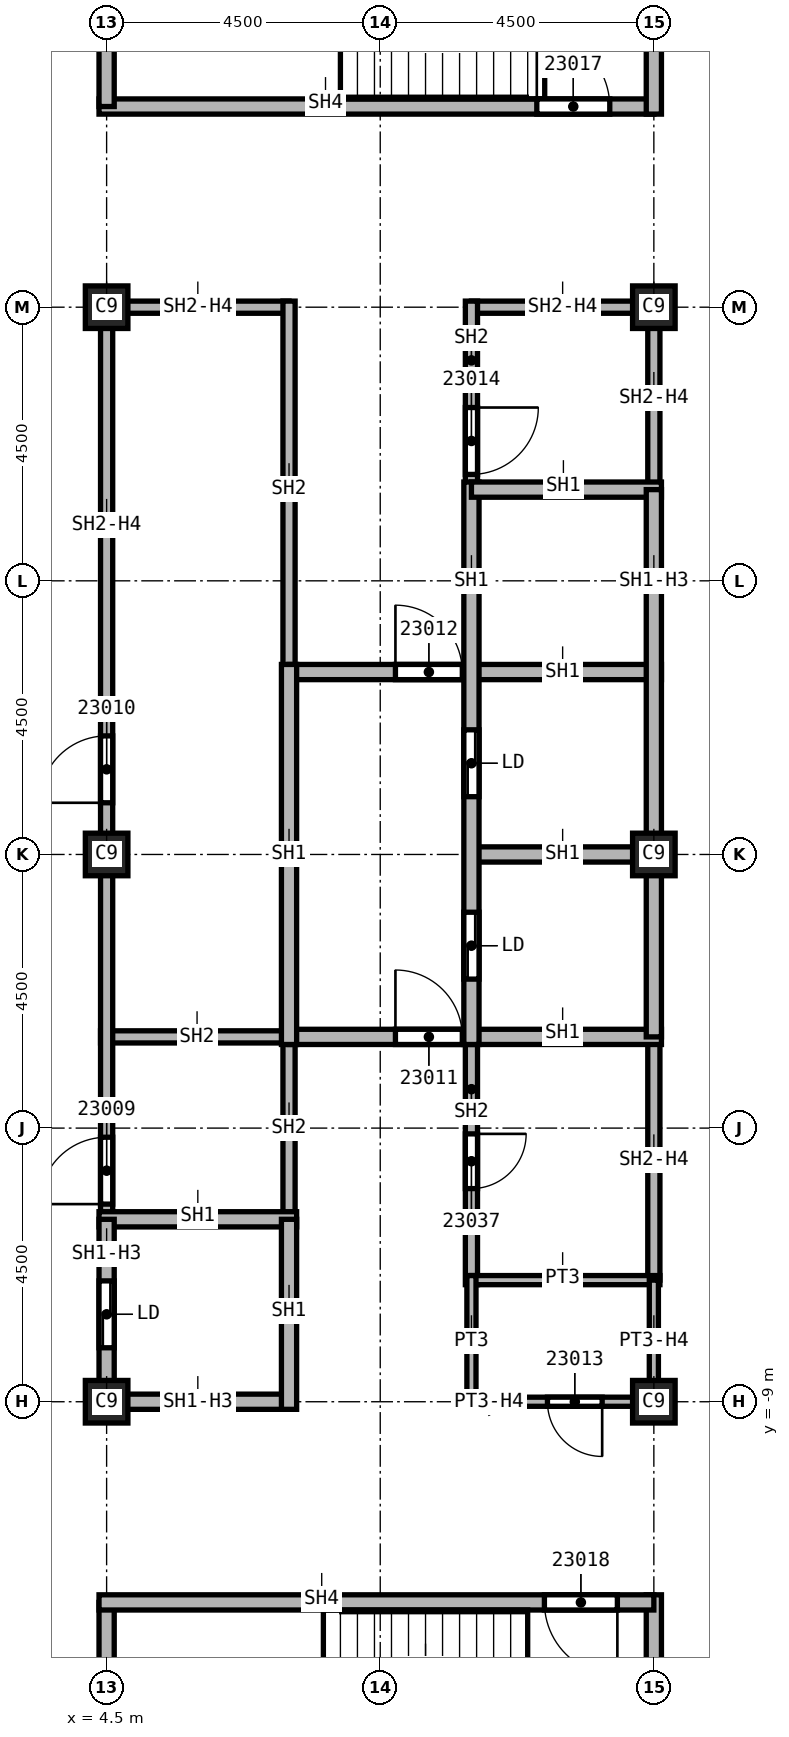
"""IFC4 building model, lengths in metres.
Left out: names, types, materials, properties, quantities, classifications, styles, units other than length and angle.
Written with IfcOpenShell. Run it as: python <this file> out.ifc"""

import sys

from ifc_helpers import new_model, si_unit, direction, frame, frame_2d, origin, origin_2d, place, context, subcontext, project, spatial, rectangle, extrude, element, fill, save


model = new_model("IFC4")
c1 = context("Model", 3, precision=1e-05, world=origin(), true_north=direction((0.0, 1.0)))
c2 = subcontext(c1, "Body", "Model", "MODEL_VIEW")
j1 = project(units=[si_unit("LENGTHUNIT", "METRE"), si_unit("PLANEANGLEUNIT", "RADIAN")], contexts=[c1])
p1 = place(None, origin())
s1 = spatial("IfcSite", under=j1, at=p1, CompositionType="ELEMENT")
p2 = place(p1, origin())
s2 = spatial("IfcBuilding", under=s1, at=p2, CompositionType="ELEMENT")
p3 = place(p2, frame((0.0, 0.0, 330.0)))
s3 = spatial("IfcBuildingStorey", under=s2, at=p3, CompositionType="ELEMENT", Elevation=330.0)
for number, where, z_axis, x_axis in (
    (1, (4.5, 0.0, 0.0), (0.0, 0.0, 1.0), (1.0, 0.0, 0.0)),
    (2, (4.5, 9.0, 0.0), (0.0, 0.0, 1.0), (1.0, 0.0, 0.0)),
    (3, (4.5, -9.0, 0.0), (0.0, 0.0, 1.0), (1.0, 0.0, 0.0)),
    (4, (13.5, 0.0, 0.0), (0.0, 0.0, 1.0), (1.0, 0.0, 0.0)),
    (5, (13.5, 9.0, 0.0), (0.0, 0.0, 1.0), (1.0, 0.0, 0.0)),
    (6, (13.5, -9.0, 0.0), (0.0, 0.0, 1.0), (1.0, 0.0, 0.0)),
):
    element("IfcColumn", number, at=place(p3, frame(where, z_axis=z_axis, x_axis=x_axis)), inside=s3, PredefinedType="COLUMN", context=c2, shape_type="SweptSolid", body=[
        extrude(rectangle(XDim=0.7, YDim=0.7, at=origin_2d()), origin(), (0.0, 0.0, 1.0), 3.74),
    ])
p4 = place(p3, frame((4.4, -3.0, 0.0), z_axis=(0.0, 0.0, 1.0), x_axis=(1.0, 0.0, 0.0)))
e7 = element("IfcWall", 7, at=p4, inside=s3, PredefinedType="SOLIDWALL", context=c2, shape_type="SweptSolid", body=[
    extrude(rectangle(XDim=3.225, YDim=0.2, at=frame_2d((1.613, 0.0))), origin(), (0.0, 0.0, 1.0), 3.74),
])
p5 = place(p3, frame((4.5, -6.0, 0.0), z_axis=(0.0, 0.0, 1.0), x_axis=(0.0, 1.0, 0.0)))
e8 = element("IfcWall", 8, at=p5, inside=s3, PredefinedType="SOLIDWALL", context=c2, shape_type="SweptSolid", body=[
    extrude(rectangle(XDim=15.1, YDim=0.2, at=frame_2d((7.55, 0.0))), origin(), (0.0, 0.0, 1.0), 3.062),
])
p6 = place(p5, frame((0.25, 0.0, 0.0)))
e9 = element("IfcOpeningElement", 9, at=p6, cuts=e8, PredefinedType="OPENING", context=c2, shape_type="SweptSolid", body=[
    extrude(rectangle(XDim=1.1, YDim=2.1, at=frame_2d((0.55, 1.05))), frame((0.0, 0.1, 0.0), z_axis=(0.0, -1.0, 0.0), x_axis=(1.0, 0.0, 0.0)), (0.0, 0.0, 1.0), 0.2),
])
p7 = place(p5, frame((6.85, 0.0, 0.0)))
e10 = element("IfcOpeningElement", 10, at=p7, cuts=e8, PredefinedType="OPENING", context=c2, shape_type="SweptSolid", body=[
    extrude(rectangle(XDim=1.1, YDim=2.1, at=frame_2d((0.55, 1.05))), frame((0.0, 0.1, 0.0), z_axis=(0.0, -1.0, 0.0), x_axis=(1.0, 0.0, 0.0)), (0.0, 0.0, 1.0), 0.2),
])
p8 = place(p3, frame((4.5, 9.0, 0.0), z_axis=(0.0, 0.0, 1.0), x_axis=(1.0, 0.0, 0.0)))
e11 = element("IfcWall", 11, at=p8, inside=s3, PredefinedType="SOLIDWALL", context=c2, shape_type="SweptSolid", body=[
    extrude(rectangle(XDim=3.0, YDim=0.2, at=frame_2d((1.5, 0.0))), origin(), (0.0, 0.0, 1.0), 3.062),
])
p9 = place(p3, frame((7.5, -2.875, 0.0), z_axis=(0.0, 0.0, 1.0), x_axis=(0.0, -1.0, 0.0)))
e12 = element("IfcWall", 12, at=p9, inside=s3, PredefinedType="SOLIDWALL", context=c2, shape_type="SweptSolid", body=[
    extrude(rectangle(XDim=3.125, YDim=0.2, at=frame_2d((1.562, 0.0))), origin(), (0.0, 0.0, 1.0), 3.74),
])
p10 = place(p3, frame((7.5, 9.1, 0.0), z_axis=(0.0, 0.0, 1.0), x_axis=(0.0, -1.0, 0.0)))
e13 = element("IfcWall", 13, at=p10, inside=s3, PredefinedType="SOLIDWALL", context=c2, shape_type="SweptSolid", body=[
    extrude(rectangle(XDim=6.225, YDim=0.2, at=frame_2d((3.113, 0.0))), origin(), (0.0, 0.0, 1.0), 3.74),
])
p11 = place(p3, frame((10.5, -2.875, 0.0), z_axis=(0.0, 0.0, 1.0), x_axis=(0.0, -1.0, 0.0)))
e14 = element("IfcWall", 14, at=p11, inside=s3, PredefinedType="SOLIDWALL", context=c2, shape_type="SweptSolid", body=[
    extrude(rectangle(XDim=4.2, YDim=0.2, at=frame_2d((2.1, 0.0))), origin(), (0.0, 0.0, 1.0), 3.74),
])
p12 = place(p11, frame((1.72, 0.0, 0.0)))
e15 = element("IfcOpeningElement", 15, at=p12, cuts=e14, PredefinedType="OPENING", context=c2, shape_type="SweptSolid", body=[
    extrude(rectangle(XDim=0.9, YDim=2.1, at=frame_2d((0.45, 1.05))), frame((0.0, 0.1, 0.0), z_axis=(0.0, -1.0, 0.0), x_axis=(1.0, 0.0, 0.0)), (0.0, 0.0, 1.0), 0.2),
])
p13 = place(p3, frame((10.5, 9.0, 0.0), z_axis=(0.0, 0.0, 1.0), x_axis=(1.0, 0.0, 0.0)))
e16 = element("IfcWall", 16, at=p13, inside=s3, PredefinedType="SOLIDWALL", context=c2, shape_type="SweptSolid", body=[
    extrude(rectangle(XDim=3.0, YDim=0.2, at=frame_2d((1.5, 0.0))), origin(), (0.0, 0.0, 1.0), 3.062),
])
p14 = place(p3, frame((10.5, 9.1, 0.0), z_axis=(0.0, 0.0, 1.0), x_axis=(0.0, -1.0, 0.0)))
e17 = element("IfcWall", 17, at=p14, inside=s3, PredefinedType="SOLIDWALL", context=c2, shape_type="SweptSolid", body=[
    extrude(rectangle(XDim=3.225, YDim=0.2, at=frame_2d((1.613, 0.0))), origin(), (0.0, 0.0, 1.0), 3.74),
])
p15 = place(p14, frame((1.75, 0.0, 0.0)))
e18 = element("IfcOpeningElement", 18, at=p15, cuts=e17, PredefinedType="OPENING", context=c2, shape_type="SweptSolid", body=[
    extrude(rectangle(XDim=1.1, YDim=2.1, at=frame_2d((0.55, 1.05))), frame((0.0, 0.1, 0.0), z_axis=(0.0, -1.0, 0.0), x_axis=(1.0, 0.0, 0.0)), (0.0, 0.0, 1.0), 0.2),
])
p16 = place(p3, frame((13.5, -3.0, 0.0), z_axis=(0.0, 0.0, 1.0), x_axis=(0.0, -1.0, 0.0)))
e19 = element("IfcWall", 19, at=p16, inside=s3, PredefinedType="SOLIDWALL", context=c2, shape_type="SweptSolid", body=[
    extrude(rectangle(XDim=4.0, YDim=0.2, at=frame_2d((2.0, 0.0))), origin(), (0.0, 0.0, 1.0), 3.062),
])
p17 = place(p3, frame((13.5, 9.1, 0.0), z_axis=(0.0, 0.0, 1.0), x_axis=(0.0, -1.0, 0.0)))
e20 = element("IfcWall", 20, at=p17, inside=s3, PredefinedType="SOLIDWALL", context=c2, shape_type="SweptSolid", body=[
    extrude(rectangle(XDim=3.1, YDim=0.2, at=frame_2d((1.55, 0.0))), origin(), (0.0, 0.0, 1.0), 3.062),
])
p18 = place(p3, frame((4.375, -6.0, 0.0), z_axis=(0.0, 0.0, 1.0), x_axis=(1.0, 0.0, 0.0)))
e21 = element("IfcWall", 21, at=p18, inside=s3, PredefinedType="SOLIDWALL", context=c2, shape_type="SweptSolid", body=[
    extrude(rectangle(XDim=3.25, YDim=0.25, at=frame_2d((1.625, 0.0))), origin(), (0.0, 0.0, 1.0), 3.74),
])
p19 = place(p3, frame((4.5, -9.125, 0.0), z_axis=(0.0, 0.0, 1.0), x_axis=(0.0, 1.0, 0.0)))
e22 = element("IfcWall", 22, at=p19, inside=s3, PredefinedType="SOLIDWALL", context=c2, shape_type="SweptSolid", body=[
    extrude(rectangle(XDim=3.125, YDim=0.25, at=frame_2d((1.562, 0.0))), origin(), (0.0, 0.0, 1.0), 3.062),
])
p20 = place(p19, frame((1.012, 0.0, 0.0)))
e23 = element("IfcOpeningElement", 23, at=p20, cuts=e22, PredefinedType="OPENING", context=c2, shape_type="SweptSolid", body=[
    extrude(rectangle(XDim=1.1, YDim=2.1, at=frame_2d((0.55, 1.05))), frame((0.0, 0.125, 0.0), z_axis=(0.0, -1.0, 0.0), x_axis=(1.0, 0.0, 0.0)), (0.0, 0.0, 1.0), 0.25),
])
p21 = place(p3, frame((7.5, -9.0, 0.0), z_axis=(0.0, 0.0, 1.0), x_axis=(-1.0, 0.0, 0.0)))
e24 = element("IfcWall", 24, at=p21, inside=s3, PredefinedType="SOLIDWALL", context=c2, shape_type="SweptSolid", body=[
    extrude(rectangle(XDim=3.0, YDim=0.25, at=frame_2d((1.5, 0.0))), origin(), (0.0, 0.0, 1.0), 3.062),
])
p22 = place(p3, frame((7.5, -6.0, 0.0), z_axis=(0.0, 0.0, 1.0), x_axis=(0.0, -1.0, 0.0)))
e25 = element("IfcWall", 25, at=p22, inside=s3, PredefinedType="SOLIDWALL", context=c2, shape_type="SweptSolid", body=[
    extrude(rectangle(XDim=3.125, YDim=0.25, at=frame_2d((1.562, 0.0))), origin(), (0.0, 0.0, 1.0), 3.74),
])
p23 = place(p3, frame((7.5, -3.0, 0.0), z_axis=(0.0, 0.0, 1.0), x_axis=(1.0, 0.0, 0.0)))
e26 = element("IfcWall", 26, at=p23, inside=s3, PredefinedType="SOLIDWALL", context=c2, shape_type="SweptSolid", body=[
    extrude(rectangle(XDim=6.125, YDim=0.25, at=frame_2d((3.062, 0.0))), origin(), (0.0, 0.0, 1.0), 3.74),
])
p24 = place(p23, frame((1.75, 0.0, 0.0)))
e27 = element("IfcOpeningElement", 27, at=p24, cuts=e26, PredefinedType="OPENING", context=c2, shape_type="SweptSolid", body=[
    extrude(rectangle(XDim=1.1, YDim=2.1, at=frame_2d((0.55, 1.05))), frame((0.0, 0.125, 0.0), z_axis=(0.0, -1.0, 0.0), x_axis=(1.0, 0.0, 0.0)), (0.0, 0.0, 1.0), 0.25),
])
p25 = place(p3, frame((7.5, 3.0, 0.0), z_axis=(0.0, 0.0, 1.0), x_axis=(1.0, 0.0, 0.0)))
e28 = element("IfcWall", 28, at=p25, inside=s3, PredefinedType="SOLIDWALL", context=c2, shape_type="SweptSolid", body=[
    extrude(rectangle(XDim=6.125, YDim=0.25, at=frame_2d((3.062, 0.0))), origin(), (0.0, 0.0, 1.0), 3.74),
])
p26 = place(p25, frame((1.75, 0.0, 0.0)))
e29 = element("IfcOpeningElement", 29, at=p26, cuts=e28, PredefinedType="OPENING", context=c2, shape_type="SweptSolid", body=[
    extrude(rectangle(XDim=1.1, YDim=2.1, at=frame_2d((0.55, 1.05))), frame((0.0, 0.125, 0.0), z_axis=(0.0, -1.0, 0.0), x_axis=(1.0, 0.0, 0.0)), (0.0, 0.0, 1.0), 0.25),
])
p27 = place(p3, frame((7.5, 3.125, 0.0), z_axis=(0.0, 0.0, 1.0), x_axis=(0.0, -1.0, 0.0)))
e30 = element("IfcWall", 30, at=p27, inside=s3, PredefinedType="SOLIDWALL", context=c2, shape_type="SweptSolid", body=[
    extrude(rectangle(XDim=6.25, YDim=0.25, at=frame_2d((3.125, 0.0))), origin(), (0.0, 0.0, 1.0), 3.74),
])
p28 = place(p3, frame((10.5, 0.0, 0.0), z_axis=(0.0, 0.0, 1.0), x_axis=(1.0, 0.0, 0.0)))
e31 = element("IfcWall", 31, at=p28, inside=s3, PredefinedType="SOLIDWALL", context=c2, shape_type="SweptSolid", body=[
    extrude(rectangle(XDim=3.125, YDim=0.25, at=frame_2d((1.562, 0.0))), origin(), (0.0, 0.0, 1.0), 3.74),
])
p29 = place(p3, frame((10.5, 6.125, 0.0), z_axis=(0.0, 0.0, 1.0), x_axis=(0.0, -1.0, 0.0)))
e32 = element("IfcWall", 32, at=p29, inside=s3, PredefinedType="SOLIDWALL", context=c2, shape_type="SweptSolid", body=[
    extrude(rectangle(XDim=9.25, YDim=0.25, at=frame_2d((4.625, 0.0))), origin(), (0.0, 0.0, 1.0), 3.74),
])
p30 = place(p29, frame((7.075, 0.0, 0.0)))
e33 = element("IfcOpeningElement", 33, at=p30, cuts=e32, PredefinedType="OPENING", context=c2, shape_type="SweptSolid", body=[
    extrude(rectangle(XDim=1.1, YDim=2.1, at=frame_2d((0.55, 1.05))), frame((0.0, 0.125, 0.0), z_axis=(0.0, -1.0, 0.0), x_axis=(1.0, 0.0, 0.0)), (0.0, 0.0, 1.0), 0.25),
])
p31 = place(p29, frame((4.075, 0.0, 0.0)))
e34 = element("IfcOpeningElement", 34, at=p31, cuts=e32, PredefinedType="OPENING", context=c2, shape_type="SweptSolid", body=[
    extrude(rectangle(XDim=1.1, YDim=2.1, at=frame_2d((0.55, 1.05))), frame((0.0, 0.125, 0.0), z_axis=(0.0, -1.0, 0.0), x_axis=(1.0, 0.0, 0.0)), (0.0, 0.0, 1.0), 0.25),
])
p32 = place(p3, frame((10.5, 6.0, 0.0), z_axis=(0.0, 0.0, 1.0), x_axis=(1.0, 0.0, 0.0)))
e35 = element("IfcWall", 35, at=p32, inside=s3, PredefinedType="SOLIDWALL", context=c2, shape_type="SweptSolid", body=[
    extrude(rectangle(XDim=3.125, YDim=0.25, at=frame_2d((1.562, 0.0))), origin(), (0.0, 0.0, 1.0), 3.74),
])
p33 = place(p3, frame((13.5, 6.0, 0.0), z_axis=(0.0, 0.0, 1.0), x_axis=(0.0, -1.0, 0.0)))
e36 = element("IfcWall", 36, at=p33, inside=s3, PredefinedType="SOLIDWALL", context=c2, shape_type="SweptSolid", body=[
    extrude(rectangle(XDim=9.0, YDim=0.25, at=frame_2d((4.5, 0.0))), origin(), (0.0, 0.0, 1.0), 3.062),
])
p34 = place(p3, frame((4.375, 12.3, 0.0), z_axis=(0.0, 0.0, 1.0), x_axis=(1.0, 0.0, 0.0)))
e37 = element("IfcWall", 37, at=p34, inside=s3, PredefinedType="SOLIDWALL", context=c2, shape_type="SweptSolid", body=[
    extrude(rectangle(XDim=9.125, YDim=0.25, at=frame_2d((4.562, 0.0))), origin(), (0.0, 0.0, 1.0), 3.74),
])
p35 = place(p34, frame((7.2, 0.0, 0.0)))
e38 = element("IfcOpeningElement", 38, at=p35, cuts=e37, PredefinedType="OPENING", context=c2, shape_type="SweptSolid", body=[
    extrude(rectangle(XDim=1.2, YDim=2.1, at=frame_2d((0.6, 1.05))), frame((0.0, 0.125, 0.0), z_axis=(0.0, -1.0, 0.0), x_axis=(1.0, 0.0, 0.0)), (0.0, 0.0, 1.0), 0.25),
])
for number, where, z_axis, x_axis in (
    (39, (4.5, -16.8, 0.0), (0.0, 0.0, 1.0), (0.0, 1.0, 0.0)),
    (40, (4.5, 12.3, 0.0), (0.0, 0.0, 1.0), (0.0, 1.0, 0.0)),
):
    element("IfcWall", number, at=place(p3, frame(where, z_axis=z_axis, x_axis=x_axis)), inside=s3, PredefinedType="SOLIDWALL", context=c2, shape_type="SweptSolid", body=[
        extrude(rectangle(XDim=4.5, YDim=0.25, at=frame_2d((2.25, 0.0))), origin(), (0.0, 0.0, 1.0), 3.74),
    ])
p36 = place(p3, frame((13.5, -16.925, 0.0), z_axis=(0.0, 0.0, 1.0), x_axis=(0.0, 1.0, 0.0)))
e41 = element("IfcWall", 41, at=p36, inside=s3, PredefinedType="SOLIDWALL", context=c2, shape_type="SweptSolid", body=[
    extrude(rectangle(XDim=4.75, YDim=0.25, at=frame_2d((2.375, 0.0))), origin(), (0.0, 0.0, 1.0), 3.74),
])
p37 = place(p3, frame((13.5, -12.3, 0.0), z_axis=(0.0, 0.0, 1.0), x_axis=(-1.0, 0.0, 0.0)))
e42 = element("IfcWall", 42, at=p37, inside=s3, PredefinedType="SOLIDWALL", context=c2, shape_type="SweptSolid", body=[
    extrude(rectangle(XDim=9.125, YDim=0.25, at=frame_2d((4.562, 0.0))), origin(), (0.0, 0.0, 1.0), 3.74),
])
p38 = place(p37, frame((0.6, 0.0, 0.0)))
e43 = element("IfcOpeningElement", 43, at=p38, cuts=e42, PredefinedType="OPENING", context=c2, shape_type="SweptSolid", body=[
    extrude(rectangle(XDim=1.2, YDim=2.1, at=frame_2d((0.6, 1.05))), frame((0.0, 0.125, 0.0), z_axis=(0.0, -1.0, 0.0), x_axis=(1.0, 0.0, 0.0)), (0.0, 0.0, 1.0), 0.25),
])
p39 = place(p3, frame((13.5, 12.175, 0.0), z_axis=(0.0, 0.0, 1.0), x_axis=(0.0, 1.0, 0.0)))
e44 = element("IfcWall", 44, at=p39, inside=s3, PredefinedType="SOLIDWALL", context=c2, shape_type="SweptSolid", body=[
    extrude(rectangle(XDim=4.75, YDim=0.25, at=frame_2d((2.375, 0.0))), origin(), (0.0, 0.0, 1.0), 3.74),
])
p40 = place(p3, frame((10.5, -7.0, 0.0), z_axis=(0.0, 0.0, 1.0), x_axis=(1.0, 0.0, 0.0)))
e45 = element("IfcWall", 45, at=p40, inside=s3, PredefinedType="PARTITIONING", context=c2, shape_type="SweptSolid", body=[
    extrude(rectangle(XDim=3.1, YDim=0.15, at=frame_2d((1.55, 0.0))), origin(), (0.0, 0.0, 1.0), 3.74),
])
p41 = place(p3, frame((10.5, -6.925, 0.0), z_axis=(0.0, 0.0, 1.0), x_axis=(0.0, -1.0, 0.0)))
e46 = element("IfcWall", 46, at=p41, inside=s3, PredefinedType="PARTITIONING", context=c2, shape_type="SweptSolid", body=[
    extrude(rectangle(XDim=2.15, YDim=0.15, at=frame_2d((1.075, 0.0))), origin(), (0.0, 0.0, 1.0), 3.74),
])
p42 = place(p3, frame((13.5, -9.0, 0.0), z_axis=(0.0, 0.0, 1.0), x_axis=(-1.0, 0.0, 0.0)))
e47 = element("IfcWall", 47, at=p42, inside=s3, PredefinedType="PARTITIONING", context=c2, shape_type="SweptSolid", body=[
    extrude(rectangle(XDim=3.0, YDim=0.15, at=frame_2d((1.5, 0.0))), origin(), (0.0, 0.0, 1.0), 3.062),
])
p43 = place(p42, frame((0.85, 0.0, 0.0)))
e48 = element("IfcOpeningElement", 48, at=p43, cuts=e47, PredefinedType="OPENING", context=c2, shape_type="SweptSolid", body=[
    extrude(rectangle(XDim=0.9, YDim=2.1, at=frame_2d((0.45, 1.05))), frame((0.0, 0.075, 0.0), z_axis=(0.0, -1.0, 0.0), x_axis=(1.0, 0.0, 0.0)), (0.0, 0.0, 1.0), 0.15),
])
p44 = place(p3, frame((13.5, -7.0, 0.0), z_axis=(0.0, 0.0, 1.0), x_axis=(0.0, -1.0, 0.0)))
e49 = element("IfcWall", 49, at=p44, inside=s3, PredefinedType="PARTITIONING", context=c2, shape_type="SweptSolid", body=[
    extrude(rectangle(XDim=2.075, YDim=0.15, at=frame_2d((1.038, 0.0))), origin(), (0.0, 0.0, 1.0), 3.062),
])
p45 = place(p6, origin())
e50 = element("IfcDoor", 50, at=p45, inside=s3, OperationType="SINGLE_SWING_RIGHT", PredefinedType="DOOR", context=c2, shape_type="SweptSolid", body=[
    extrude(rectangle(XDim=1.1, YDim=2.1, at=frame_2d((0.55, 1.05))), frame((0.0, 0.025, 0.0), z_axis=(0.0, -1.0, 0.0), x_axis=(1.0, 0.0, 0.0)), (0.0, 0.0, 1.0), 0.05),
])
fill(e9, e50)
p46 = place(p7, origin())
e51 = element("IfcDoor", 51, at=p46, inside=s3, OperationType="SINGLE_SWING_LEFT", PredefinedType="DOOR", context=c2, shape_type="SweptSolid", body=[
    extrude(rectangle(XDim=1.1, YDim=2.1, at=frame_2d((0.55, 1.05))), frame((0.0, 0.025, 0.0), z_axis=(0.0, -1.0, 0.0), x_axis=(1.0, 0.0, 0.0)), (0.0, 0.0, 1.0), 0.05),
])
fill(e10, e51)
p47 = place(p24, origin())
e52 = element("IfcDoor", 52, at=p47, inside=s3, OperationType="SINGLE_SWING_RIGHT", PredefinedType="DOOR", context=c2, shape_type="SweptSolid", body=[
    extrude(rectangle(XDim=1.1, YDim=2.1, at=frame_2d((0.55, 1.05))), frame((0.0, 0.025, 0.0), z_axis=(0.0, -1.0, 0.0), x_axis=(1.0, 0.0, 0.0)), (0.0, 0.0, 1.0), 0.05),
])
fill(e27, e52)
p48 = place(p26, origin())
e53 = element("IfcDoor", 53, at=p48, inside=s3, OperationType="SINGLE_SWING_LEFT", PredefinedType="DOOR", context=c2, shape_type="SweptSolid", body=[
    extrude(rectangle(XDim=1.1, YDim=2.1, at=frame_2d((0.55, 1.05))), frame((0.0, 0.025, 0.0), z_axis=(0.0, -1.0, 0.0), x_axis=(1.0, 0.0, 0.0)), (0.0, 0.0, 1.0), 0.05),
])
fill(e29, e53)
p49 = place(p43, origin())
e54 = element("IfcDoor", 54, at=p49, inside=s3, OperationType="SINGLE_SWING_RIGHT", PredefinedType="DOOR", context=c2, shape_type="SweptSolid", body=[
    extrude(rectangle(XDim=0.9, YDim=2.1, at=frame_2d((0.45, 1.05))), frame((0.0, 0.025, 0.0), z_axis=(0.0, -1.0, 0.0), x_axis=(1.0, 0.0, 0.0)), (0.0, 0.0, 1.0), 0.05),
])
fill(e48, e54)
p50 = place(p15, origin())
e55 = element("IfcDoor", 55, at=p50, inside=s3, OperationType="SINGLE_SWING_LEFT", PredefinedType="DOOR", context=c2, shape_type="SweptSolid", body=[
    extrude(rectangle(XDim=1.1, YDim=2.1, at=frame_2d((0.55, 1.05))), frame((0.0, 0.025, 0.0), z_axis=(0.0, -1.0, 0.0), x_axis=(1.0, 0.0, 0.0)), (0.0, 0.0, 1.0), 0.05),
])
fill(e18, e55)
p51 = place(p35, origin())
e56 = element("IfcDoor", 56, at=p51, inside=s3, OperationType="SINGLE_SWING_RIGHT", PredefinedType="DOOR", context=c2, shape_type="SweptSolid", body=[
    extrude(rectangle(XDim=1.2, YDim=2.1, at=frame_2d((0.6, 1.05))), frame((0.0, 0.025, 0.0), z_axis=(0.0, -1.0, 0.0), x_axis=(1.0, 0.0, 0.0)), (0.0, 0.0, 1.0), 0.05),
])
fill(e38, e56)
p52 = place(p38, origin())
e57 = element("IfcDoor", 57, at=p52, inside=s3, OperationType="SINGLE_SWING_LEFT", PredefinedType="DOOR", context=c2, shape_type="SweptSolid", body=[
    extrude(rectangle(XDim=1.2, YDim=2.1, at=frame_2d((0.6, 1.05))), frame((0.0, 0.025, 0.0), z_axis=(0.0, -1.0, 0.0), x_axis=(1.0, 0.0, 0.0)), (0.0, 0.0, 1.0), 0.05),
])
fill(e43, e57)
p53 = place(p12, origin())
e58 = element("IfcDoor", 58, at=p53, inside=s3, OperationType="SINGLE_SWING_LEFT", PredefinedType="DOOR", context=c2, shape_type="SweptSolid", body=[
    extrude(rectangle(XDim=0.9, YDim=2.1, at=frame_2d((0.45, 1.05))), frame((0.0, 0.025, 0.0), z_axis=(0.0, -1.0, 0.0), x_axis=(1.0, 0.0, 0.0)), (0.0, 0.0, 1.0), 0.05),
])
fill(e15, e58)
p54 = place(p20, origin())
e59 = element("IfcDoor", 59, at=p54, inside=s3, OperationType="SLIDING_TO_LEFT", PredefinedType="DOOR", context=c2, shape_type="SweptSolid", body=[
    extrude(rectangle(XDim=1.1, YDim=2.1, at=frame_2d((0.55, 1.05))), frame((0.0, 0.025, 0.0), z_axis=(0.0, -1.0, 0.0), x_axis=(1.0, 0.0, 0.0)), (0.0, 0.0, 1.0), 0.05),
])
fill(e23, e59)
p55 = place(p30, origin())
e60 = element("IfcDoor", 60, at=p55, inside=s3, OperationType="SLIDING_TO_LEFT", PredefinedType="DOOR", context=c2, shape_type="SweptSolid", body=[
    extrude(rectangle(XDim=1.1, YDim=2.1, at=frame_2d((0.55, 1.05))), frame((0.0, 0.025, 0.0), z_axis=(0.0, -1.0, 0.0), x_axis=(1.0, 0.0, 0.0)), (0.0, 0.0, 1.0), 0.05),
])
fill(e33, e60)
p56 = place(p31, origin())
e61 = element("IfcDoor", 61, at=p56, inside=s3, OperationType="SLIDING_TO_LEFT", PredefinedType="DOOR", context=c2, shape_type="SweptSolid", body=[
    extrude(rectangle(XDim=1.1, YDim=2.1, at=frame_2d((0.55, 1.05))), frame((0.0, 0.025, 0.0), z_axis=(0.0, -1.0, 0.0), x_axis=(1.0, 0.0, 0.0)), (0.0, 0.0, 1.0), 0.05),
])
fill(e34, e61)
save(model, sys.argv[1])
